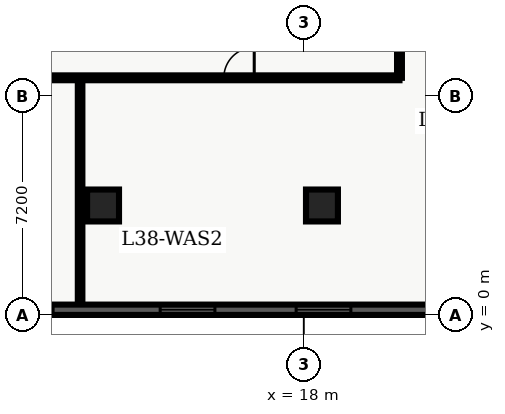
"""IFC4 building model, lengths in metres.
Left out: names, types, materials, properties, quantities, classifications, styles, units other than length and angle.
Written with IfcOpenShell. Run it as: python <this file> out.ifc"""

import sys

from ifc_helpers import new_model, entity, si_unit, converted_unit, direction, frame, origin_with_axes, origin_2d_with_axis, place, context, subcontext, project, spatial, polyline, rectangle, outline, extrude, element, fill, save


model = new_model("IFC4")
c1 = context("Model", 3, precision=1e-05, world=origin_with_axes(), true_north=direction((0.0, 1.0)))
c2 = subcontext(c1, "Body", "Model", "MODEL_VIEW")
j1 = project(units=[si_unit("LENGTHUNIT", "METRE"), converted_unit("PLANEANGLEUNIT", "DEGREE", entity("IfcPlaneAngleMeasure", 0.017), si_unit("PLANEANGLEUNIT", "RADIAN"), dimensions=[0, 0, 0, 0, 0, 0, 0])], contexts=[c1])
p1 = place(None, origin_with_axes())
s1 = spatial("IfcSite", under=j1, at=p1, CompositionType="ELEMENT")
p2 = place(p1, origin_with_axes())
s2 = spatial("IfcBuilding", under=s1, at=p2, CompositionType="ELEMENT")
p3 = place(p2, frame((0.0, 0.0, 156.3), z_axis=(0.0, 0.0, 1.0), x_axis=(1.0, 0.0, 0.0)))
s3 = spatial("IfcBuildingStorey", under=s2, at=p3, CompositionType="ELEMENT", Elevation=156.3)
for number, where, z_axis, x_axis in (
    (1, (11.4, 3.6, 0.0), (0.0, 0.0, 1.0), (1.0, 0.0, 0.0)),
    (2, (18.6, 3.6, 0.0), (0.0, 0.0, 1.0), (1.0, 0.0, 0.0)),
):
    element("IfcColumn", number, at=place(p3, frame(where, z_axis=z_axis, x_axis=x_axis)), inside=s3, PredefinedType="COLUMN", context=c2, shape_type="SweptSolid", body=[
        extrude(rectangle(XDim=1.05, YDim=1.05, at=origin_2d_with_axis()), origin_with_axes(), (0.0, 0.0, 1.0), 3.9),
    ])
p4 = place(p3, frame((2.6, 7.8, 0.0), z_axis=(0.0, 0.0, 1.0), x_axis=(1.0, 0.0, 0.0)))
e3 = element("IfcWall", 3, at=p4, inside=s3, PredefinedType="PARTITIONING", context=c2, shape_type="SweptSolid", body=[
    extrude(outline(polyline([(0.0, -0.08), (18.55, -0.08), (18.55, 0.08), (0.0, 0.08), (0.0, -0.08)])), origin_with_axes(), (0.0, 0.0, 1.0), 2.7),
])
p5 = place(p4, frame((3.737, 0.0, 0.0), z_axis=(0.0, 0.0, 1.0), x_axis=(1.0, 0.0, 0.0)))
e4 = element("IfcOpeningElement", 4, at=p5, cuts=e3, PredefinedType="OPENING", context=c2, shape_type="SweptSolid", body=[
    extrude(rectangle(XDim=1.0, YDim=0.18, at=origin_2d_with_axis()), origin_with_axes(), (0.0, 0.0, 1.0), 2.15),
])
p6 = place(p4, frame((13.273, 0.0, 0.0), z_axis=(0.0, 0.0, 1.0), x_axis=(1.0, 0.0, 0.0)))
e5 = element("IfcOpeningElement", 5, at=p6, cuts=e3, PredefinedType="OPENING", context=c2, shape_type="SweptSolid", body=[
    extrude(rectangle(XDim=1.0, YDim=0.18, at=origin_2d_with_axis()), origin_with_axes(), (0.0, 0.0, 1.0), 2.15),
])
p7 = place(p3, frame((21.15, 7.8, 0.0), z_axis=(0.0, 0.0, 1.0), x_axis=(0.0, 1.0, 0.0)))
e6 = element("IfcWall", 6, at=p7, inside=s3, PredefinedType="PARTITIONING", context=c2, shape_type="SweptSolid", body=[
    extrude(outline(polyline([(0.0, -0.08), (32.7, -0.08), (32.7, 0.08), (0.0, 0.08), (0.0, -0.08)])), origin_with_axes(), (0.0, 0.0, 1.0), 2.7),
])
p8 = place(p7, frame((5.775, 0.0, 0.0), z_axis=(0.0, 0.0, 1.0), x_axis=(1.0, 0.0, 0.0)))
e7 = element("IfcOpeningElement", 7, at=p8, cuts=e6, PredefinedType="OPENING", context=c2, shape_type="SweptSolid", body=[
    extrude(rectangle(XDim=1.05, YDim=0.18, at=origin_2d_with_axis()), origin_with_axes(), (0.0, 0.0, 1.0), 2.15),
])
p9 = place(p3, frame((10.645, 0.335, 0.0), z_axis=(0.0, 0.0, 1.0), x_axis=(0.0, 1.0, 0.0)))
e8 = element("IfcWall", 8, at=p9, inside=s3, PredefinedType="PARTITIONING", context=c2, shape_type="SweptSolid", body=[
    extrude(outline(polyline([(0.0, -0.075), (7.365, -0.075), (7.365, 0.075), (0.0, 0.075), (0.0, -0.075)])), origin_with_axes(), (0.0, 0.0, 1.0), 2.7),
])
p10 = place(p3, frame((57.26, 0.17, 0.0), z_axis=(0.0, 0.0, 1.0), x_axis=(-1.0, 0.0, 0.0)))
e9 = element("IfcWall", 9, at=p10, inside=s3, PredefinedType="SOLIDWALL", context=c2, shape_type="SweptSolid", body=[
    extrude(outline(polyline([(0.0, -0.17), (54.86, -0.17), (54.86, 0.17), (0.0, 0.17), (0.0, -0.17)])), origin_with_axes(), (0.0, 0.0, 1.0), 3.66),
])
p11 = place(p10, frame((2.836, 0.0, 0.45), z_axis=(0.0, 0.0, 1.0), x_axis=(1.0, 0.0, 0.0)))
e10 = element("IfcOpeningElement", 10, at=p11, cuts=e9, PredefinedType="OPENING", context=c2, shape_type="SweptSolid", body=[
    extrude(rectangle(XDim=1.8, YDim=0.36, at=origin_2d_with_axis()), origin_with_axes(), (0.0, 0.0, 1.0), 2.1),
])
p12 = place(p10, frame((7.307, 0.0, 0.45), z_axis=(0.0, 0.0, 1.0), x_axis=(1.0, 0.0, 0.0)))
e11 = element("IfcOpeningElement", 11, at=p12, cuts=e9, PredefinedType="OPENING", context=c2, shape_type="SweptSolid", body=[
    extrude(rectangle(XDim=1.8, YDim=0.36, at=origin_2d_with_axis()), origin_with_axes(), (0.0, 0.0, 1.0), 2.1),
])
p13 = place(p10, frame((11.779, 0.0, 0.45), z_axis=(0.0, 0.0, 1.0), x_axis=(1.0, 0.0, 0.0)))
e12 = element("IfcOpeningElement", 12, at=p13, cuts=e9, PredefinedType="OPENING", context=c2, shape_type="SweptSolid", body=[
    extrude(rectangle(XDim=1.8, YDim=0.36, at=origin_2d_with_axis()), origin_with_axes(), (0.0, 0.0, 1.0), 2.1),
])
p14 = place(p10, frame((16.251, 0.0, 0.45), z_axis=(0.0, 0.0, 1.0), x_axis=(1.0, 0.0, 0.0)))
e13 = element("IfcOpeningElement", 13, at=p14, cuts=e9, PredefinedType="OPENING", context=c2, shape_type="SweptSolid", body=[
    extrude(rectangle(XDim=1.8, YDim=0.36, at=origin_2d_with_axis()), origin_with_axes(), (0.0, 0.0, 1.0), 2.1),
])
p15 = place(p10, frame((20.723, 0.0, 0.45), z_axis=(0.0, 0.0, 1.0), x_axis=(1.0, 0.0, 0.0)))
e14 = element("IfcOpeningElement", 14, at=p15, cuts=e9, PredefinedType="OPENING", context=c2, shape_type="SweptSolid", body=[
    extrude(rectangle(XDim=1.8, YDim=0.36, at=origin_2d_with_axis()), origin_with_axes(), (0.0, 0.0, 1.0), 2.1),
])
p16 = place(p10, frame((25.194, 0.0, 0.45), z_axis=(0.0, 0.0, 1.0), x_axis=(1.0, 0.0, 0.0)))
e15 = element("IfcOpeningElement", 15, at=p16, cuts=e9, PredefinedType="OPENING", context=c2, shape_type="SweptSolid", body=[
    extrude(rectangle(XDim=1.8, YDim=0.36, at=origin_2d_with_axis()), origin_with_axes(), (0.0, 0.0, 1.0), 2.1),
])
p17 = place(p10, frame((29.666, 0.0, 0.45), z_axis=(0.0, 0.0, 1.0), x_axis=(1.0, 0.0, 0.0)))
e16 = element("IfcOpeningElement", 16, at=p17, cuts=e9, PredefinedType="OPENING", context=c2, shape_type="SweptSolid", body=[
    extrude(rectangle(XDim=1.8, YDim=0.36, at=origin_2d_with_axis()), origin_with_axes(), (0.0, 0.0, 1.0), 2.1),
])
p18 = place(p10, frame((34.138, 0.0, 0.45), z_axis=(0.0, 0.0, 1.0), x_axis=(1.0, 0.0, 0.0)))
e17 = element("IfcOpeningElement", 17, at=p18, cuts=e9, PredefinedType="OPENING", context=c2, shape_type="SweptSolid", body=[
    extrude(rectangle(XDim=1.8, YDim=0.36, at=origin_2d_with_axis()), origin_with_axes(), (0.0, 0.0, 1.0), 2.1),
])
p19 = place(p10, frame((38.609, 0.0, 0.45), z_axis=(0.0, 0.0, 1.0), x_axis=(1.0, 0.0, 0.0)))
e18 = element("IfcOpeningElement", 18, at=p19, cuts=e9, PredefinedType="OPENING", context=c2, shape_type="SweptSolid", body=[
    extrude(rectangle(XDim=1.8, YDim=0.36, at=origin_2d_with_axis()), origin_with_axes(), (0.0, 0.0, 1.0), 2.1),
])
p20 = place(p10, frame((43.081, 0.0, 0.45), z_axis=(0.0, 0.0, 1.0), x_axis=(1.0, 0.0, 0.0)))
e19 = element("IfcOpeningElement", 19, at=p20, cuts=e9, PredefinedType="OPENING", context=c2, shape_type="SweptSolid", body=[
    extrude(rectangle(XDim=1.8, YDim=0.36, at=origin_2d_with_axis()), origin_with_axes(), (0.0, 0.0, 1.0), 2.1),
])
p21 = place(p10, frame((48.403, 0.0, 0.45), z_axis=(0.0, 0.0, 1.0), x_axis=(1.0, 0.0, 0.0)))
e20 = element("IfcOpeningElement", 20, at=p21, cuts=e9, PredefinedType="OPENING", context=c2, shape_type="SweptSolid", body=[
    extrude(rectangle(XDim=1.8, YDim=0.36, at=origin_2d_with_axis()), origin_with_axes(), (0.0, 0.0, 1.0), 2.1),
])
p22 = place(p10, frame((52.024, 0.0, 0.45), z_axis=(0.0, 0.0, 1.0), x_axis=(1.0, 0.0, 0.0)))
e21 = element("IfcOpeningElement", 21, at=p22, cuts=e9, PredefinedType="OPENING", context=c2, shape_type="SweptSolid", body=[
    extrude(rectangle(XDim=1.8, YDim=0.36, at=origin_2d_with_axis()), origin_with_axes(), (0.0, 0.0, 1.0), 2.1),
])
p23 = place(p4, frame((13.273, 0.0, 0.0), z_axis=(0.0, 0.0, 1.0), x_axis=(1.0, 0.0, 0.0)))
e22 = element("IfcDoor", 22, at=p23, inside=s3, OperationType="SINGLE_SWING_RIGHT", PredefinedType="DOOR", context=c2, shape_type="SweptSolid", body=[
    extrude(rectangle(XDim=1.0, YDim=0.09, at=origin_2d_with_axis()), origin_with_axes(), (0.0, 0.0, 1.0), 2.15),
])
fill(e5, e22)
p24 = place(p10, frame((38.609, 0.0, 0.45), z_axis=(0.0, 0.0, 1.0), x_axis=(1.0, 0.0, 0.0)))
e23 = element("IfcWindow", 23, at=p24, inside=s3, PredefinedType="WINDOW", context=c2, shape_type="SweptSolid", body=[
    extrude(rectangle(XDim=1.8, YDim=0.09, at=origin_2d_with_axis()), origin_with_axes(), (0.0, 0.0, 1.0), 2.1),
])
fill(e18, e23)
p25 = place(p10, frame((43.081, 0.0, 0.45), z_axis=(0.0, 0.0, 1.0), x_axis=(1.0, 0.0, 0.0)))
e24 = element("IfcWindow", 24, at=p25, inside=s3, PredefinedType="WINDOW", context=c2, shape_type="SweptSolid", body=[
    extrude(rectangle(XDim=1.8, YDim=0.09, at=origin_2d_with_axis()), origin_with_axes(), (0.0, 0.0, 1.0), 2.1),
])
fill(e19, e24)
p26 = place(p10, frame((48.403, 0.0, 0.45), z_axis=(0.0, 0.0, 1.0), x_axis=(1.0, 0.0, 0.0)))
e25 = element("IfcWindow", 25, at=p26, inside=s3, PredefinedType="WINDOW", context=c2, shape_type="SweptSolid", body=[
    extrude(rectangle(XDim=1.8, YDim=0.09, at=origin_2d_with_axis()), origin_with_axes(), (0.0, 0.0, 1.0), 2.1),
])
fill(e20, e25)
save(model, sys.argv[1])
